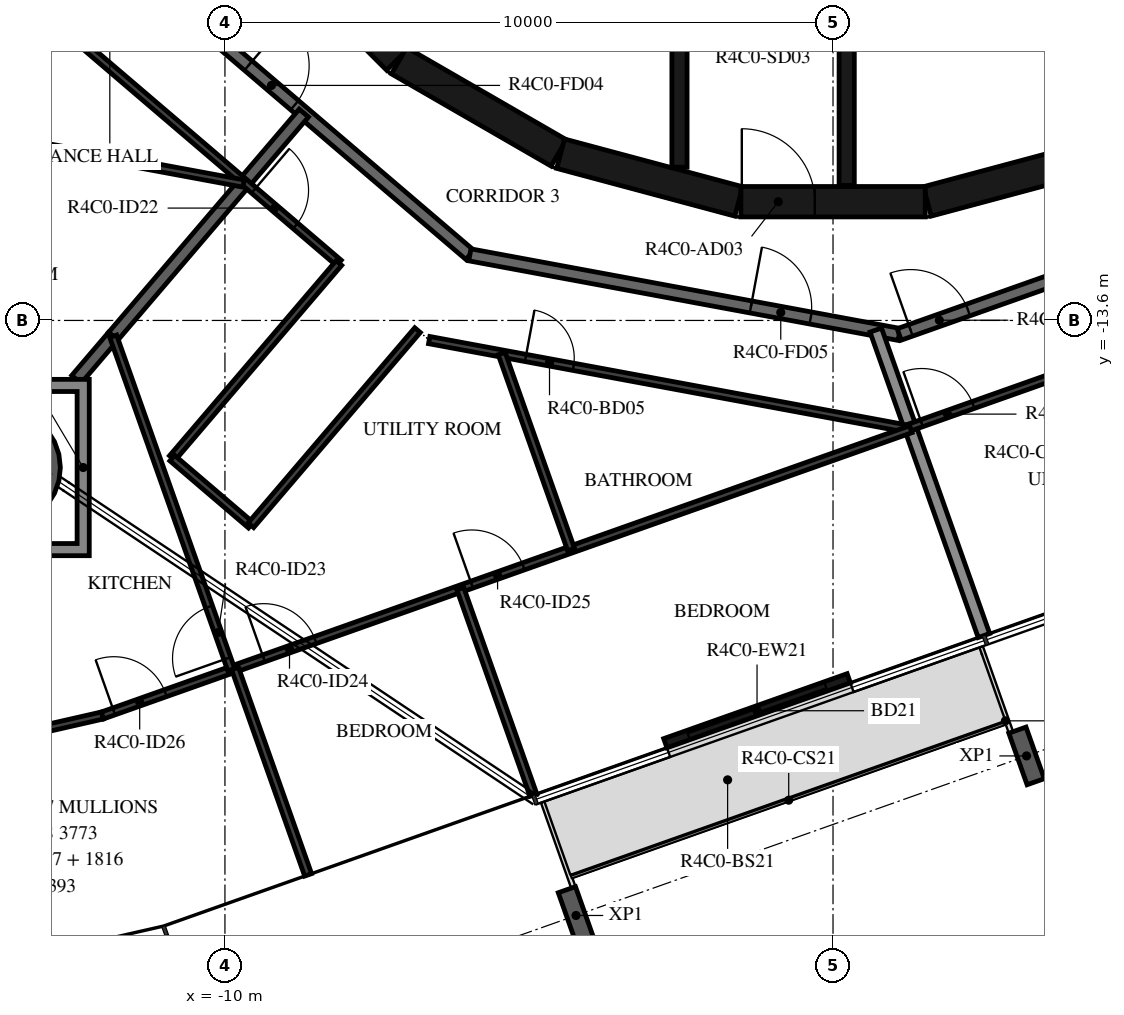
"""IFC4 building model, lengths in metres.
Left out: names, types, materials, properties, quantities, classifications, styles, units other than length and angle.
Written with IfcOpenShell. Run it as: python <this file> out.ifc"""

import sys

from ifc_helpers import new_model, si_unit, direction, frame, frame_2d, origin, origin_2d, place, context, subcontext, project, spatial, polyline, rectangle, hollow_circle, i_section, outline, extrude, element, fill, save


model = new_model("IFC4")
c1 = context("Model", 3, precision=1e-05, world=origin(), true_north=direction((0.0, 1.0)))
c2 = subcontext(c1, "Body", "Model", "MODEL_VIEW")
j1 = project(units=[si_unit("LENGTHUNIT", "METRE"), si_unit("PLANEANGLEUNIT", "RADIAN")], contexts=[c1])
p1 = place(None, origin())
s1 = spatial("IfcSite", under=j1, at=p1, CompositionType="ELEMENT")
p2 = place(p1, origin())
s2 = spatial("IfcBuilding", under=s1, at=p2, CompositionType="ELEMENT")
p3 = place(p2, frame((0.0, 0.0, 172.7)))
s3 = spatial("IfcBuildingStorey", under=s2, at=p3, CompositionType="ELEMENT", Elevation=172.7)
p4 = place(p3, frame((-13.681, -16.019, -0.38), z_axis=(0.0, 0.0, 1.0), x_axis=(1.0, 0.0, 0.0)))
e1 = element("IfcColumn", 1, at=p4, inside=s3, PredefinedType="COLUMN", context=c2, shape_type="SweptSolid", body=[
    extrude(hollow_circle(Radius=0.975, WallThickness=0.045, at=origin_2d()), origin(), (0.0, 0.0, 1.0), 3.5),
])
for number, where, z_axis, x_axis in (
    (2, (-4.226, -23.385, -0.38), (0.0, 0.0, 1.0), (-0.943, -0.334, 0.0)),
    (3, (3.183, -20.761, -0.38), (0.0, 0.0, 1.0), (-0.943, -0.334, 0.0)),
):
    element("IfcColumn", number, at=place(p3, frame(where, z_axis=z_axis, x_axis=x_axis)), inside=s3, PredefinedType="COLUMN", context=c2, shape_type="SweptSolid", body=[
        extrude(i_section(OverallWidth=0.3, OverallDepth=0.9, WebThickness=0.019, FlangeThickness=0.035, FilletRadius=0.03, at=origin_2d()), origin(), (0.0, 0.0, 1.0), 3.5),
    ])
p5 = place(p3, frame((-2.758, -20.552, 0.0), z_axis=(0.0, 0.0, 1.0), x_axis=(0.94265323131, 0.333773704029, 0.0)))
e4 = element("IfcWall", 4, at=p5, inside=s3, PredefinedType="STANDARD", context=c2, shape_type="SweptSolid", body=[
    extrude(rectangle(XDim=3.2, YDim=0.16, at=frame_2d((1.6, 0.0))), origin(), (0.0, 0.0, 1.0), 3.12),
])
p6 = place(p5, frame((0.4, 0.0, 0.0)))
e5 = element("IfcOpeningElement", 5, at=p6, cuts=e4, PredefinedType="OPENING", context=c2, shape_type="SweptSolid", body=[
    extrude(rectangle(XDim=2.4, YDim=2.4, at=frame_2d((1.2, 1.2))), frame((0.0, 0.09, 0.0), z_axis=(0.0, -1.0, 0.0), x_axis=(1.0, 0.0, 0.0)), (0.0, 0.0, 1.0), 0.18),
])
p7 = place(p3, frame((1.55, -11.643, 0.0), z_axis=(0.0, 0.0, 1.0), x_axis=(0.965948410781, 0.258734743916, 0.0)))
e6 = element("IfcWall", 6, at=p7, inside=s3, PredefinedType="SHEAR", context=c2, shape_type="SweptSolid", body=[
    extrude(rectangle(XDim=3.033, YDim=0.5, at=frame_2d((1.516, 0.0))), origin(), (0.0, 0.0, 1.0), 3.12),
])
p8 = place(p3, frame((-9.308, -7.164, 0.0), z_axis=(0.0, 0.0, 1.0), x_axis=(0.707106781187, -0.707106781187, 0.0)))
e7 = element("IfcWall", 7, at=p8, inside=s3, PredefinedType="SHEAR", context=c2, shape_type="SweptSolid", body=[
    extrude(rectangle(XDim=3.032, YDim=0.5, at=frame_2d((1.516, 0.0))), origin(), (0.0, 0.0, 1.0), 3.12),
])
for number, where, z_axis, x_axis in (
    (8, (-7.137, -9.329, 0.0), (0.0, 0.0, 1.0), (0.866, -0.5, 0.0)),
    (9, (-4.479, -10.858, 0.0), (0.0, 0.0, 1.0), (0.966, -0.259, 0.0)),
):
    element("IfcWall", number, at=place(p3, frame(where, z_axis=z_axis, x_axis=x_axis)), inside=s3, PredefinedType="SHEAR", context=c2, shape_type="SweptSolid", body=[
        extrude(rectangle(XDim=3.033, YDim=0.5, at=frame_2d((1.516, 0.0))), origin(), (0.0, 0.0, 1.0), 3.12),
    ])
p9 = place(p3, frame((-1.516, -11.647, 0.0), z_axis=(0.0, 0.0, 1.0), x_axis=(1.0, 0.0, 0.0)))
e10 = element("IfcWall", 10, at=p9, inside=s3, PredefinedType="SHEAR", context=c2, shape_type="SweptSolid", body=[
    extrude(rectangle(XDim=3.033, YDim=0.5, at=frame_2d((1.516, 0.0))), origin(), (0.0, 0.0, 1.0), 3.12),
])
p10 = place(p9, frame((0.016, 0.0, 0.0)))
e11 = element("IfcOpeningElement", 11, at=p10, cuts=e10, PredefinedType="OPENING", context=c2, shape_type="SweptSolid", body=[
    extrude(rectangle(XDim=1.2, YDim=2.1, at=frame_2d((0.6, 1.05))), frame((0.0, 0.26, 0.0), z_axis=(0.0, -1.0, 0.0), x_axis=(1.0, 0.0, 0.0)), (0.0, 0.0, 1.0), 0.52),
])
p11 = place(p3, frame((-2.525, -8.97, 0.0), z_axis=(0.0, 0.0, 1.0), x_axis=(0.0, -1.0, 0.0)))
e12 = element("IfcWall", 12, at=p11, inside=s3, PredefinedType="SHEAR", context=c2, shape_type="SweptSolid", body=[
    extrude(rectangle(XDim=2.11, YDim=0.25, at=frame_2d((1.055, 0.0))), origin(), (0.0, 0.0, 1.0), 3.12),
])
p12 = place(p3, frame((0.225, -8.97, 0.0), z_axis=(0.0, 0.0, 1.0), x_axis=(0.0, -1.0, 0.0)))
e13 = element("IfcWall", 13, at=p12, inside=s3, PredefinedType="SHEAR", context=c2, shape_type="SweptSolid", body=[
    extrude(rectangle(XDim=2.41, YDim=0.25, at=frame_2d((1.205, 0.0))), origin(), (0.0, 0.0, 1.0), 3.12),
])
p13 = place(p3, frame((-11.433, -7.858, 0.0), z_axis=(0.0, 0.0, 1.0), x_axis=(0.760412154545, -0.649440801937, 0.0)))
e14 = element("IfcWall", 14, at=p13, inside=s3, PredefinedType="STANDARD", context=c2, shape_type="SweptSolid", body=[
    extrude(rectangle(XDim=7.181, YDim=0.2, at=frame_2d((3.59, 0.0))), origin(), (0.0, 0.0, 1.0), 3.12),
])
p14 = place(p13, frame((2.39, 0.0, 0.0)))
e15 = element("IfcOpeningElement", 15, at=p14, cuts=e14, PredefinedType="OPENING", context=c2, shape_type="SweptSolid", body=[
    extrude(rectangle(XDim=1.0, YDim=2.1, at=frame_2d((0.5, 1.05))), frame((0.0, 0.11, 0.0), z_axis=(0.0, -1.0, 0.0), x_axis=(1.0, 0.0, 0.0)), (0.0, 0.0, 1.0), 0.22),
])
p15 = place(p3, frame((-5.972, -12.521, 0.0), z_axis=(0.0, 0.0, 1.0), x_axis=(0.983256068163, -0.18222926335, 0.0)))
e16 = element("IfcWall", 16, at=p15, inside=s3, PredefinedType="STANDARD", context=c2, shape_type="SweptSolid", body=[
    extrude(rectangle(XDim=7.181, YDim=0.2, at=frame_2d((3.59, 0.0))), origin(), (0.0, 0.0, 1.0), 3.12),
])
p16 = place(p15, frame((4.7, 0.0, 0.0)))
e17 = element("IfcOpeningElement", 17, at=p16, cuts=e16, PredefinedType="OPENING", context=c2, shape_type="SweptSolid", body=[
    extrude(rectangle(XDim=1.0, YDim=2.1, at=frame_2d((0.5, 1.05))), frame((0.0, 0.11, 0.0), z_axis=(0.0, -1.0, 0.0), x_axis=(1.0, 0.0, 0.0)), (0.0, 0.0, 1.0), 0.22),
])
p17 = place(p3, frame((1.088, -13.83, 0.0), z_axis=(0.0, 0.0, 1.0), x_axis=(0.942648397945, 0.333787354241, 0.0)))
e18 = element("IfcWall", 18, at=p17, inside=s3, PredefinedType="STANDARD", context=c2, shape_type="SweptSolid", body=[
    extrude(rectangle(XDim=7.181, YDim=0.2, at=frame_2d((3.591, 0.0))), origin(), (0.0, 0.0, 1.0), 3.12),
])
p18 = place(p17, frame((0.2, 0.0, 0.0)))
e19 = element("IfcOpeningElement", 19, at=p18, cuts=e18, PredefinedType="OPENING", context=c2, shape_type="SweptSolid", body=[
    extrude(rectangle(XDim=1.0, YDim=2.1, at=frame_2d((0.5, 1.05))), frame((0.0, 0.11, 0.0), z_axis=(0.0, -1.0, 0.0), x_axis=(1.0, 0.0, 0.0)), (0.0, 0.0, 1.0), 0.22),
])
p19 = place(p3, frame((-11.838, -13.86, 0.0), z_axis=(0.0, 0.0, 1.0), x_axis=(0.64944503311, 0.760408540831, 0.0)))
e20 = element("IfcWall", 20, at=p19, inside=s3, PredefinedType="STANDARD", context=c2, shape_type="SweptSolid", body=[
    extrude(rectangle(XDim=4.827, YDim=0.2, at=frame_2d((2.414, 0.0))), origin(), (0.0, 0.0, 1.0), 3.12),
])
p20 = place(p3, frame((-12.443, -14.569, 0.0), z_axis=(0.0, 0.0, 1.0), x_axis=(0.649517408851, 0.760346720648, 0.0)))
e21 = element("IfcWall", 21, at=p20, inside=s3, PredefinedType="STANDARD", context=c2, shape_type="SweptSolid", body=[
    extrude(rectangle(XDim=0.932, YDim=0.2, at=frame_2d((0.466, 0.0))), origin(), (0.0, 0.0, 1.0), 3.12),
])
p21 = place(p3, frame((2.482, -18.782, 0.0), z_axis=(0.0, 0.0, 1.0), x_axis=(-0.333807281402, 0.942641341594, 0.0)))
e22 = element("IfcWall", 22, at=p21, inside=s3, PredefinedType="STANDARD", context=c2, shape_type="SweptSolid", body=[
    extrude(rectangle(XDim=5.329, YDim=0.2, at=frame_2d((2.665, 0.0))), origin(), (0.0, 0.0, 1.0), 2.73),
])
p22 = place(p3, frame((-12.713, -8.737, 0.0), z_axis=(0.0, 0.0, 1.0), x_axis=(0.760432387723, -0.649417110725, 0.0)))
e23 = element("IfcWall", 23, at=p22, inside=s3, PredefinedType="PARTITIONING", context=c2, shape_type="SweptSolid", body=[
    extrude(rectangle(XDim=6.032, YDim=0.12, at=frame_2d((3.016, 0.0))), origin(), (0.0, 0.0, 1.0), 3.12),
])
p23 = place(p22, frame((4.192, 0.0, 0.0)))
e24 = element("IfcOpeningElement", 24, at=p23, cuts=e23, PredefinedType="OPENING", context=c2, shape_type="SweptSolid", body=[
    extrude(rectangle(XDim=0.9, YDim=2.1, at=frame_2d((0.45, 1.05))), frame((0.0, 0.07, 0.0), z_axis=(0.0, -1.0, 0.0), x_axis=(1.0, 0.0, 0.0)), (0.0, 0.0, 1.0), 0.14),
])
p24 = place(p3, frame((-16.252, -10.133, 0.0), z_axis=(0.0, 0.0, 1.0), x_axis=(0.983256998026, -0.182224246005, 0.0)))
e25 = element("IfcWall", 25, at=p24, inside=s3, PredefinedType="PARTITIONING", context=c2, shape_type="SweptSolid", body=[
    extrude(rectangle(XDim=6.671, YDim=0.12, at=frame_2d((3.335, 0.0))), origin(), (0.0, 0.0, 1.0), 3.12),
])
p25 = place(p24, frame((0.2, 0.0, 0.0)))
e26 = element("IfcOpeningElement", 26, at=p25, cuts=e25, PredefinedType="OPENING", context=c2, shape_type="SweptSolid", body=[
    extrude(rectangle(XDim=0.9, YDim=2.1, at=frame_2d((0.45, 1.05))), frame((0.0, 0.07, 0.0), z_axis=(0.0, -1.0, 0.0), x_axis=(1.0, 0.0, 0.0)), (0.0, 0.0, 1.0), 0.14),
])
p26 = place(p3, frame((-8.125, -12.655, 0.0), z_axis=(0.0, 0.0, 1.0), x_axis=(-0.649441944702, -0.760411178549, 0.0)))
e27 = element("IfcWall", 27, at=p26, inside=s3, PredefinedType="PARTITIONING", context=c2, shape_type="SweptSolid", body=[
    extrude(rectangle(XDim=4.22, YDim=0.12, at=frame_2d((2.11, 0.0))), origin(), (0.0, 0.0, 1.0), 3.12),
])
p27 = place(p3, frame((-10.866, -15.864, 0.0), z_axis=(0.0, 0.0, 1.0), x_axis=(0.760431300628, -0.649418383652, 0.0)))
e28 = element("IfcWall", 28, at=p27, inside=s3, PredefinedType="PARTITIONING", context=c2, shape_type="SweptSolid", body=[
    extrude(rectangle(XDim=1.7, YDim=0.12, at=frame_2d((0.85, 0.0))), origin(), (0.0, 0.0, 1.0), 3.12),
])
p28 = place(p3, frame((-9.573, -16.968, 0.0), z_axis=(0.0, 0.0, 1.0), x_axis=(0.649437062208, 0.760415348498, 0.0)))
e29 = element("IfcWall", 29, at=p28, inside=s3, PredefinedType="PARTITIONING", context=c2, shape_type="SweptSolid", body=[
    extrude(rectangle(XDim=4.219, YDim=0.12, at=frame_2d((2.11, 0.0))), origin(), (0.0, 0.0, 1.0), 3.12),
])
p29 = place(p3, frame((-6.641, -13.923, 0.0), z_axis=(0.0, 0.0, 1.0), x_axis=(0.983250157272, -0.182261153912, 0.0)))
e30 = element("IfcWall", 30, at=p29, inside=s3, PredefinedType="PARTITIONING", context=c2, shape_type="SweptSolid", body=[
    extrude(rectangle(XDim=7.985, YDim=0.12, at=frame_2d((3.992, 0.0))), origin(), (0.0, 0.0, 1.0), 3.12),
])
p30 = place(p29, frame((1.612, 0.0, 0.0)))
e31 = element("IfcOpeningElement", 31, at=p30, cuts=e30, PredefinedType="OPENING", context=c2, shape_type="SweptSolid", body=[
    extrude(rectangle(XDim=0.8, YDim=2.1, at=frame_2d((0.4, 1.05))), frame((0.0, 0.07, 0.0), z_axis=(0.0, -1.0, 0.0), x_axis=(1.0, 0.0, 0.0)), (0.0, 0.0, 1.0), 0.14),
])
p31 = place(p3, frame((-13.211, -20.369, 0.0), z_axis=(0.0, 0.0, 1.0), x_axis=(0.974997834831, 0.222214360642, 0.0)))
e32 = element("IfcWall", 32, at=p31, inside=s3, PredefinedType="PARTITIONING", context=c2, shape_type="SweptSolid", body=[
    extrude(rectangle(XDim=1.227, YDim=0.12, at=frame_2d((0.614, 0.0))), origin(), (0.0, 0.0, 1.0), 3.12),
])
p32 = place(p3, frame((-12.015, -20.096, 0.0), z_axis=(0.0, 0.0, 1.0), x_axis=(0.942638913957, 0.33381413675, 0.0)))
e33 = element("IfcWall", 33, at=p32, inside=s3, PredefinedType="PARTITIONING", context=c2, shape_type="SweptSolid", body=[
    extrude(rectangle(XDim=14.104, YDim=0.12, at=frame_2d((7.052, 0.0))), origin(), (0.0, 0.0, 1.0), 3.12),
])
p33 = place(p32, frame((2.814, 0.0, 0.0)))
e34 = element("IfcOpeningElement", 34, at=p33, cuts=e33, PredefinedType="OPENING", context=c2, shape_type="SweptSolid", body=[
    extrude(rectangle(XDim=0.9, YDim=2.1, at=frame_2d((0.45, 1.05))), frame((0.0, 0.07, 0.0), z_axis=(0.0, -1.0, 0.0), x_axis=(1.0, 0.0, 0.0)), (0.0, 0.0, 1.0), 0.14),
])
p34 = place(p32, frame((6.444, 0.0, 0.0)))
e35 = element("IfcOpeningElement", 35, at=p34, cuts=e33, PredefinedType="OPENING", context=c2, shape_type="SweptSolid", body=[
    extrude(rectangle(XDim=0.9, YDim=2.1, at=frame_2d((0.45, 1.05))), frame((0.0, 0.07, 0.0), z_axis=(0.0, -1.0, 0.0), x_axis=(1.0, 0.0, 0.0)), (0.0, 0.0, 1.0), 0.14),
])
p35 = place(p32, frame((0.2, 0.0, 0.0)))
e36 = element("IfcOpeningElement", 36, at=p35, cuts=e33, PredefinedType="OPENING", context=c2, shape_type="SweptSolid", body=[
    extrude(rectangle(XDim=0.9, YDim=2.1, at=frame_2d((0.45, 1.05))), frame((0.0, 0.07, 0.0), z_axis=(0.0, -1.0, 0.0), x_axis=(1.0, 0.0, 0.0)), (0.0, 0.0, 1.0), 0.14),
])
p36 = place(p3, frame((-9.895, -19.346, 0.0), z_axis=(0.0, 0.0, 1.0), x_axis=(-0.333781129158, 0.942650602195, 0.0)))
e37 = element("IfcWall", 37, at=p36, inside=s3, PredefinedType="PARTITIONING", context=c2, shape_type="SweptSolid", body=[
    extrude(rectangle(XDim=5.819, YDim=0.12, at=frame_2d((2.91, 0.0))), origin(), (0.0, 0.0, 1.0), 3.12),
])
p37 = place(p36, frame((0.2, 0.0, 0.0)))
e38 = element("IfcOpeningElement", 38, at=p37, cuts=e37, PredefinedType="OPENING", context=c2, shape_type="SweptSolid", body=[
    extrude(rectangle(XDim=0.9, YDim=2.1, at=frame_2d((0.45, 1.05))), frame((0.0, 0.07, 0.0), z_axis=(0.0, -1.0, 0.0), x_axis=(1.0, 0.0, 0.0)), (0.0, 0.0, 1.0), 0.14),
])
p38 = place(p3, frame((-8.632, -22.718, 0.0), z_axis=(0.0, 0.0, 1.0), x_axis=(-0.333791905243, 0.942646786445, 0.0)))
e39 = element("IfcWall", 39, at=p38, inside=s3, PredefinedType="PARTITIONING", context=c2, shape_type="SweptSolid", body=[
    extrude(rectangle(XDim=3.6, YDim=0.12, at=frame_2d((1.8, 0.0))), origin(), (0.0, 0.0, 1.0), 3.12),
])
p39 = place(p3, frame((-4.308, -17.367, 0.0), z_axis=(0.0, 0.0, 1.0), x_axis=(-0.333802202677, 0.942643140052, 0.0)))
e40 = element("IfcWall", 40, at=p39, inside=s3, PredefinedType="PARTITIONING", context=c2, shape_type="SweptSolid", body=[
    extrude(rectangle(XDim=3.419, YDim=0.12, at=frame_2d((1.709, 0.0))), origin(), (0.0, 0.0, 1.0), 3.12),
])
p40 = place(p3, frame((-4.927, -21.406, 0.0), z_axis=(0.0, 0.0, 1.0), x_axis=(-0.333813244781, 0.942639229827, 0.0)))
e41 = element("IfcWall", 41, at=p40, inside=s3, PredefinedType="PARTITIONING", context=c2, shape_type="SweptSolid", body=[
    extrude(rectangle(XDim=3.6, YDim=0.12, at=frame_2d((1.8, 0.0))), origin(), (0.0, 0.0, 1.0), 2.73),
])
p41 = place(p3, frame((1.269, -15.357, 0.0), z_axis=(0.0, 0.0, 1.0), x_axis=(0.942639442898, 0.333812643101, 0.0)))
e42 = element("IfcWall", 42, at=p41, inside=s3, PredefinedType="PARTITIONING", context=c2, shape_type="SweptSolid", body=[
    extrude(rectangle(XDim=7.86, YDim=0.12, at=frame_2d((3.93, 0.0))), origin(), (0.0, 0.0, 1.0), 3.12),
])
p42 = place(p41, frame((0.2, 0.0, 0.0)))
e43 = element("IfcOpeningElement", 43, at=p42, cuts=e42, PredefinedType="OPENING", context=c2, shape_type="SweptSolid", body=[
    extrude(rectangle(XDim=0.9, YDim=2.1, at=frame_2d((0.45, 1.05))), frame((0.0, 0.07, 0.0), z_axis=(0.0, -1.0, 0.0), x_axis=(1.0, 0.0, 0.0)), (0.0, 0.0, 1.0), 0.14),
])
p43 = place(p3, origin())
e44 = element("IfcWall", 44, at=p43, inside=s3, PredefinedType="STANDARD", context=c2, shape_type="SweptSolid", body=[
    extrude(outline(polyline([(-12.231, -14.569), (-12.231, -17.469), (-15.131, -17.469), (-15.131, -14.569), (-12.231, -14.569)]), holes=[polyline([(-14.931, -17.269), (-12.431, -17.269), (-12.431, -14.769), (-14.931, -14.769), (-14.931, -17.269)])]), origin(), (0.0, 0.0, 1.0), 3.12),
])
p44 = place(p6, origin())
e45 = element("IfcDoor", 45, at=p44, inside=s3, OperationType="DOUBLE_DOOR_SLIDING", PredefinedType="DOOR", context=c2, shape_type="SweptSolid", body=[
    extrude(rectangle(XDim=2.4, YDim=2.4, at=frame_2d((1.2, 1.2))), frame((0.0, 0.025, 0.0), z_axis=(0.0, -1.0, 0.0), x_axis=(1.0, 0.0, 0.0)), (0.0, 0.0, 1.0), 0.05),
])
fill(e5, e45)
p45 = place(p10, origin())
e46 = element("IfcDoor", 46, at=p45, inside=s3, OperationType="SINGLE_SWING_RIGHT", PredefinedType="DOOR", context=c2, shape_type="SweptSolid", body=[
    extrude(rectangle(XDim=1.2, YDim=2.1, at=frame_2d((0.6, 1.05))), frame((0.0, 0.025, 0.0), z_axis=(0.0, -1.0, 0.0), x_axis=(1.0, 0.0, 0.0)), (0.0, 0.0, 1.0), 0.05),
])
fill(e11, e46)
p46 = place(p14, origin())
e47 = element("IfcDoor", 47, at=p46, inside=s3, OperationType="SINGLE_SWING_RIGHT", PredefinedType="DOOR", context=c2, shape_type="SweptSolid", body=[
    extrude(rectangle(XDim=1.0, YDim=2.1, at=frame_2d((0.5, 1.05))), frame((0.0, 0.025, 0.0), z_axis=(0.0, -1.0, 0.0), x_axis=(1.0, 0.0, 0.0)), (0.0, 0.0, 1.0), 0.05),
])
fill(e15, e47)
p47 = place(p16, origin())
e48 = element("IfcDoor", 48, at=p47, inside=s3, OperationType="SINGLE_SWING_LEFT", PredefinedType="DOOR", context=c2, shape_type="SweptSolid", body=[
    extrude(rectangle(XDim=1.0, YDim=2.1, at=frame_2d((0.5, 1.05))), frame((0.0, 0.025, 0.0), z_axis=(0.0, -1.0, 0.0), x_axis=(1.0, 0.0, 0.0)), (0.0, 0.0, 1.0), 0.05),
])
fill(e17, e48)
p48 = place(p23, origin())
e49 = element("IfcDoor", 49, at=p48, inside=s3, OperationType="SINGLE_SWING_LEFT", PredefinedType="DOOR", context=c2, shape_type="SweptSolid", body=[
    extrude(rectangle(XDim=0.9, YDim=2.1, at=frame_2d((0.45, 1.05))), frame((0.0, 0.025, 0.0), z_axis=(0.0, -1.0, 0.0), x_axis=(1.0, 0.0, 0.0)), (0.0, 0.0, 1.0), 0.05),
])
fill(e24, e49)
p49 = place(p30, origin())
e50 = element("IfcDoor", 50, at=p49, inside=s3, OperationType="SINGLE_SWING_LEFT", PredefinedType="DOOR", context=c2, shape_type="SweptSolid", body=[
    extrude(rectangle(XDim=0.8, YDim=2.1, at=frame_2d((0.4, 1.05))), frame((0.0, 0.025, 0.0), z_axis=(0.0, -1.0, 0.0), x_axis=(1.0, 0.0, 0.0)), (0.0, 0.0, 1.0), 0.05),
])
fill(e31, e50)
p50 = place(p37, origin())
e51 = element("IfcDoor", 51, at=p50, inside=s3, OperationType="SINGLE_SWING_LEFT", PredefinedType="DOOR", context=c2, shape_type="SweptSolid", body=[
    extrude(rectangle(XDim=0.9, YDim=2.1, at=frame_2d((0.45, 1.05))), frame((0.0, 0.025, 0.0), z_axis=(0.0, -1.0, 0.0), x_axis=(1.0, 0.0, 0.0)), (0.0, 0.0, 1.0), 0.05),
])
fill(e38, e51)
p51 = place(p33, origin())
e52 = element("IfcDoor", 52, at=p51, inside=s3, OperationType="SINGLE_SWING_LEFT", PredefinedType="DOOR", context=c2, shape_type="SweptSolid", body=[
    extrude(rectangle(XDim=0.9, YDim=2.1, at=frame_2d((0.45, 1.05))), frame((0.0, 0.025, 0.0), z_axis=(0.0, -1.0, 0.0), x_axis=(1.0, 0.0, 0.0)), (0.0, 0.0, 1.0), 0.05),
])
fill(e34, e52)
p52 = place(p34, origin())
e53 = element("IfcDoor", 53, at=p52, inside=s3, OperationType="SINGLE_SWING_LEFT", PredefinedType="DOOR", context=c2, shape_type="SweptSolid", body=[
    extrude(rectangle(XDim=0.9, YDim=2.1, at=frame_2d((0.45, 1.05))), frame((0.0, 0.025, 0.0), z_axis=(0.0, -1.0, 0.0), x_axis=(1.0, 0.0, 0.0)), (0.0, 0.0, 1.0), 0.05),
])
fill(e35, e53)
p53 = place(p35, origin())
e54 = element("IfcDoor", 54, at=p53, inside=s3, OperationType="SINGLE_SWING_RIGHT", PredefinedType="DOOR", context=c2, shape_type="SweptSolid", body=[
    extrude(rectangle(XDim=0.9, YDim=2.1, at=frame_2d((0.45, 1.05))), frame((0.0, 0.025, 0.0), z_axis=(0.0, -1.0, 0.0), x_axis=(1.0, 0.0, 0.0)), (0.0, 0.0, 1.0), 0.05),
])
fill(e36, e54)
p54 = place(p18, origin())
e55 = element("IfcDoor", 55, at=p54, inside=s3, OperationType="SINGLE_SWING_LEFT", PredefinedType="DOOR", context=c2, shape_type="SweptSolid", body=[
    extrude(rectangle(XDim=1.0, YDim=2.1, at=frame_2d((0.5, 1.05))), frame((0.0, 0.025, 0.0), z_axis=(0.0, -1.0, 0.0), x_axis=(1.0, 0.0, 0.0)), (0.0, 0.0, 1.0), 0.05),
])
fill(e19, e55)
p55 = place(p42, origin())
e56 = element("IfcDoor", 56, at=p55, inside=s3, OperationType="SINGLE_SWING_LEFT", PredefinedType="DOOR", context=c2, shape_type="SweptSolid", body=[
    extrude(rectangle(XDim=0.9, YDim=2.1, at=frame_2d((0.45, 1.05))), frame((0.0, 0.025, 0.0), z_axis=(0.0, -1.0, 0.0), x_axis=(1.0, 0.0, 0.0)), (0.0, 0.0, 1.0), 0.05),
])
fill(e43, e56)
save(model, sys.argv[1])
